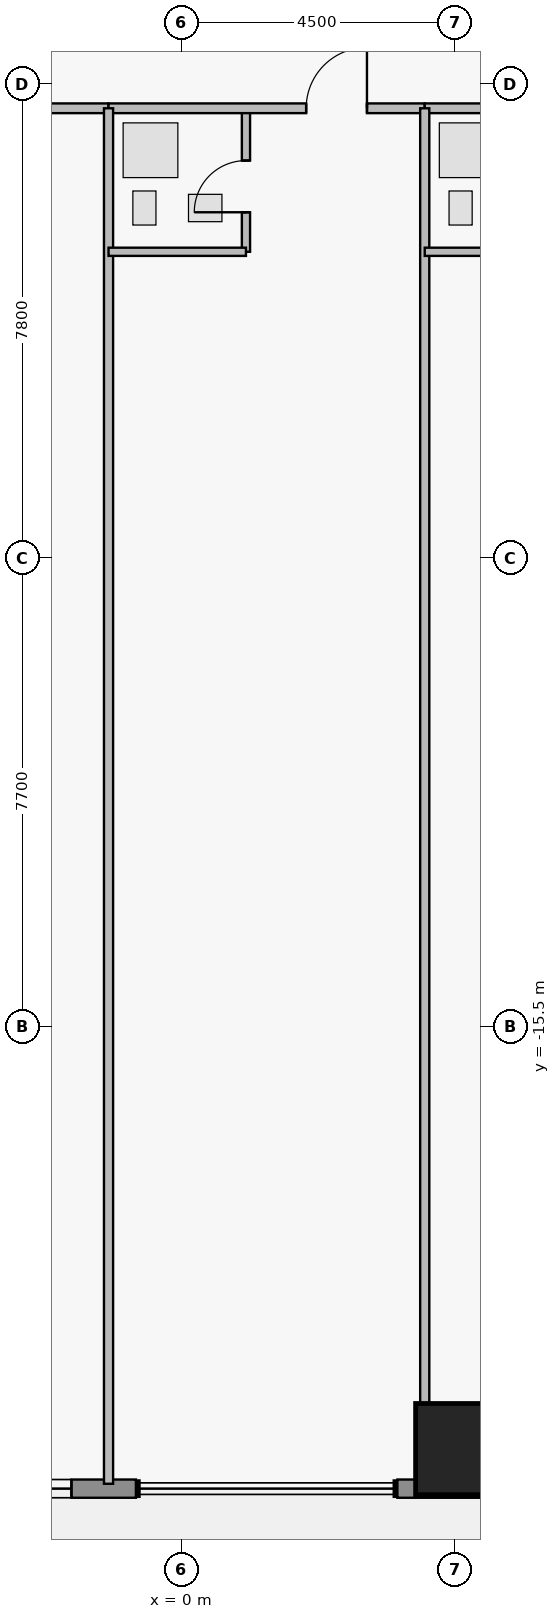
"""IFC4 building model, lengths in metres.
Left out: names, types, materials, properties, quantities, classifications, styles, units other than length and angle.
Written with IfcOpenShell. Run it as: python <this file> out.ifc"""

import sys

from ifc_helpers import new_model, si_unit, direction, frame, frame_2d, origin, origin_2d, place, context, subcontext, project, spatial, rectangle, extrude, element, fill, save


model = new_model("IFC4")
c1 = context("Model", 3, precision=1e-05, world=origin(), true_north=direction((0.0, 1.0)))
c2 = subcontext(c1, "Body", "Model", "MODEL_VIEW")
j1 = project(units=[si_unit("LENGTHUNIT", "METRE"), si_unit("PLANEANGLEUNIT", "RADIAN")], contexts=[c1])
p1 = place(None, origin())
s1 = spatial("IfcSite", under=j1, at=p1, CompositionType="ELEMENT")
p2 = place(p1, origin())
s2 = spatial("IfcBuilding", under=s1, at=p2, CompositionType="ELEMENT")
p3 = place(p2, frame((0.0, 0.0, 27.6)))
s3 = spatial("IfcBuildingStorey", under=s2, at=p3, CompositionType="ELEMENT", Elevation=27.6)
p4 = place(p3, frame((4.6, -22.45, 0.0), z_axis=(0.0, 0.0, 1.0), x_axis=(1.0, 0.0, 0.0)))
e1 = element("IfcColumn", 1, at=p4, inside=s3, PredefinedType="COLUMN", context=c2, shape_type="SweptSolid", body=[
    extrude(rectangle(XDim=1.5, YDim=1.5, at=origin_2d()), origin(), (0.0, 0.0, 1.0), 3.65),
])
p5 = place(p3, frame((5.52, -23.1, 0.0), z_axis=(0.0, 0.0, 1.0), x_axis=(-1.0, 0.0, 0.0)))
e2 = element("IfcWall", 2, at=p5, inside=s3, PredefinedType="STANDARD", context=c2, shape_type="SweptSolid", body=[
    extrude(rectangle(XDim=1.97, YDim=0.3, at=frame_2d((0.985, 0.0))), origin(), (0.0, 0.0, 1.0), 3.43),
])
p6 = place(p3, frame((-0.75, -23.1, 0.0), z_axis=(0.0, 0.0, 1.0), x_axis=(-1.0, 0.0, 0.0)))
e3 = element("IfcWall", 3, at=p6, inside=s3, PredefinedType="STANDARD", context=c2, shape_type="SweptSolid", body=[
    extrude(rectangle(XDim=13.97, YDim=0.3, at=frame_2d((6.985, 0.0))), origin(), (0.0, 0.0, 1.0), 3.43),
])
p7 = place(p6, frame((8.053, 0.0, 0.0)))
e4 = element("IfcOpeningElement", 4, at=p7, cuts=e3, PredefinedType="OPENING", context=c2, shape_type="SweptSolid", body=[
    extrude(rectangle(XDim=1.05, YDim=2.2, at=frame_2d((0.525, 1.1))), frame((0.0, 0.16, 0.0), z_axis=(0.0, -1.0, 0.0), x_axis=(1.0, 0.0, 0.0)), (0.0, 0.0, 1.0), 0.32),
])
p8 = place(p6, frame((1.06, 0.0, 0.85)))
e5 = element("IfcOpeningElement", 5, at=p8, cuts=e3, PredefinedType="OPENING", context=c2, shape_type="SweptSolid", body=[
    extrude(rectangle(XDim=1.6, YDim=1.8, at=frame_2d((0.8, 0.9))), frame((0.0, 0.16, 0.0), z_axis=(0.0, -1.0, 0.0), x_axis=(1.0, 0.0, 0.0)), (0.0, 0.0, 1.0), 0.32),
])
p9 = place(p6, frame((4.865, 0.0, 0.95)))
e6 = element("IfcOpeningElement", 6, at=p9, cuts=e3, PredefinedType="OPENING", context=c2, shape_type="SweptSolid", body=[
    extrude(rectangle(XDim=1.15, YDim=1.55, at=frame_2d((0.575, 0.775))), frame((0.0, 0.16, 0.0), z_axis=(0.0, -1.0, 0.0), x_axis=(1.0, 0.0, 0.0)), (0.0, 0.0, 1.0), 0.32),
])
p10 = place(p6, frame((9.842, 0.0, 0.85)))
e7 = element("IfcOpeningElement", 7, at=p10, cuts=e3, PredefinedType="OPENING", context=c2, shape_type="SweptSolid", body=[
    extrude(rectangle(XDim=1.6, YDim=1.8, at=frame_2d((0.8, 0.9))), frame((0.0, 0.16, 0.0), z_axis=(0.0, -1.0, 0.0), x_axis=(1.0, 0.0, 0.0)), (0.0, 0.0, 1.0), 0.32),
])
p11 = place(p3, frame((-7.2, -0.4, 0.0), z_axis=(0.0, 0.0, 1.0), x_axis=(1.0, 0.0, 0.0)))
e8 = element("IfcWall", 8, at=p11, inside=s3, PredefinedType="PARTITIONING", context=c2, shape_type="SweptSolid", body=[
    extrude(rectangle(XDim=6.0, YDim=0.16, at=frame_2d((3.0, 0.0))), origin(), (0.0, 0.0, 1.0), 3.43),
])
p12 = place(p11, frame((3.65, 0.0, 0.0)))
e9 = element("IfcOpeningElement", 9, at=p12, cuts=e8, PredefinedType="OPENING", context=c2, shape_type="SweptSolid", body=[
    extrude(rectangle(XDim=1.0, YDim=2.15, at=frame_2d((0.5, 1.075))), frame((0.0, 0.09, 0.0), z_axis=(0.0, -1.0, 0.0), x_axis=(1.0, 0.0, 0.0)), (0.0, 0.0, 1.0), 0.18),
])
p13 = place(p3, frame((1.06, -2.76, 0.0), z_axis=(0.0, 0.0, 1.0), x_axis=(0.0, 1.0, 0.0)))
e10 = element("IfcWall", 10, at=p13, inside=s3, PredefinedType="PLUMBINGWALL", context=c2, shape_type="SweptSolid", body=[
    extrude(rectangle(XDim=2.36, YDim=0.135, at=frame_2d((1.18, 0.0))), origin(), (0.0, 0.0, 1.0), 3.43),
])
p14 = place(p13, frame((0.65, 0.0, 0.0)))
e11 = element("IfcOpeningElement", 11, at=p14, cuts=e10, PredefinedType="OPENING", context=c2, shape_type="SweptSolid", body=[
    extrude(rectangle(XDim=0.85, YDim=2.1, at=frame_2d((0.425, 1.05))), frame((0.0, 0.077, 0.0), z_axis=(0.0, -1.0, 0.0), x_axis=(1.0, 0.0, 0.0)), (0.0, 0.0, 1.0), 0.155),
])
p15 = place(p3, frame((-1.2, -0.4, 0.0), z_axis=(0.0, 0.0, 1.0), x_axis=(1.0, 0.0, 0.0)))
e12 = element("IfcWall", 12, at=p15, inside=s3, PredefinedType="PARTITIONING", context=c2, shape_type="SweptSolid", body=[
    extrude(rectangle(XDim=5.2, YDim=0.16, at=frame_2d((2.6, 0.0))), origin(), (0.0, 0.0, 1.0), 3.43),
])
p16 = place(p15, frame((3.25, 0.0, 0.0)))
e13 = element("IfcOpeningElement", 13, at=p16, cuts=e12, PredefinedType="OPENING", context=c2, shape_type="SweptSolid", body=[
    extrude(rectangle(XDim=1.0, YDim=2.15, at=frame_2d((0.5, 1.075))), frame((0.0, 0.09, 0.0), z_axis=(0.0, -1.0, 0.0), x_axis=(1.0, 0.0, 0.0)), (0.0, 0.0, 1.0), 0.18),
])
p17 = place(p3, frame((4.0, -0.4, 0.0), z_axis=(0.0, 0.0, 1.0), x_axis=(1.0, 0.0, 0.0)))
e14 = element("IfcWall", 14, at=p17, inside=s3, PredefinedType="PARTITIONING", context=c2, shape_type="SweptSolid", body=[
    extrude(rectangle(XDim=5.8, YDim=0.16, at=frame_2d((2.9, 0.0))), origin(), (0.0, 0.0, 1.0), 3.43),
])
p18 = place(p17, frame((3.55, 0.0, 0.0)))
e15 = element("IfcOpeningElement", 15, at=p18, cuts=e14, PredefinedType="OPENING", context=c2, shape_type="SweptSolid", body=[
    extrude(rectangle(XDim=1.0, YDim=2.15, at=frame_2d((0.5, 1.075))), frame((0.0, 0.09, 0.0), z_axis=(0.0, -1.0, 0.0), x_axis=(1.0, 0.0, 0.0)), (0.0, 0.0, 1.0), 0.18),
])
p19 = place(p3, frame((-1.2, -23.02, 0.0), z_axis=(0.0, 0.0, 1.0), x_axis=(0.0, 1.0, 0.0)))
e16 = element("IfcWall", 16, at=p19, inside=s3, PredefinedType="PARTITIONING", context=c2, shape_type="SweptSolid", body=[
    extrude(rectangle(XDim=22.62, YDim=0.15, at=frame_2d((11.31, 0.0))), origin(), (0.0, 0.0, 1.0), 3.43),
])
p20 = place(p3, frame((-1.2, -2.76, 0.0), z_axis=(0.0, 0.0, 1.0), x_axis=(1.0, 0.0, 0.0)))
e17 = element("IfcWall", 17, at=p20, inside=s3, PredefinedType="PLUMBINGWALL", context=c2, shape_type="SweptSolid", body=[
    extrude(rectangle(XDim=2.26, YDim=0.135, at=frame_2d((1.13, 0.0))), origin(), (0.0, 0.0, 1.0), 3.43),
])
p21 = place(p3, frame((4.0, -23.02, 0.0), z_axis=(0.0, 0.0, 1.0), x_axis=(0.0, 1.0, 0.0)))
e18 = element("IfcWall", 18, at=p21, inside=s3, PredefinedType="PARTITIONING", context=c2, shape_type="SweptSolid", body=[
    extrude(rectangle(XDim=22.62, YDim=0.15, at=frame_2d((11.31, 0.0))), origin(), (0.0, 0.0, 1.0), 3.43),
])
p22 = place(p3, frame((4.0, -2.76, 0.0), z_axis=(0.0, 0.0, 1.0), x_axis=(1.0, 0.0, 0.0)))
e19 = element("IfcWall", 19, at=p22, inside=s3, PredefinedType="PLUMBINGWALL", context=c2, shape_type="SweptSolid", body=[
    extrude(rectangle(XDim=2.26, YDim=0.135, at=frame_2d((1.13, 0.0))), origin(), (0.0, 0.0, 1.0), 3.43),
])
p23 = place(p8, origin())
e20 = element("IfcWindow", 20, at=p23, inside=s3, PartitioningType="SINGLE_PANEL", PredefinedType="WINDOW", context=c2, shape_type="SweptSolid", body=[
    extrude(rectangle(XDim=1.6, YDim=1.8, at=frame_2d((0.8, 0.9))), frame((0.0, 0.03, 0.0), z_axis=(0.0, -1.0, 0.0), x_axis=(1.0, 0.0, 0.0)), (0.0, 0.0, 1.0), 0.06),
])
fill(e5, e20)
p24 = place(p14, origin())
e21 = element("IfcDoor", 21, at=p24, inside=s3, OperationType="SINGLE_SWING_LEFT", PredefinedType="DOOR", context=c2, shape_type="SweptSolid", body=[
    extrude(rectangle(XDim=0.85, YDim=2.1, at=frame_2d((0.425, 1.05))), frame((0.0, 0.025, 0.0), z_axis=(0.0, -1.0, 0.0), x_axis=(1.0, 0.0, 0.0)), (0.0, 0.0, 1.0), 0.05),
])
fill(e11, e21)
p25 = place(p16, origin())
e22 = element("IfcDoor", 22, at=p25, inside=s3, OperationType="SINGLE_SWING_RIGHT", PredefinedType="DOOR", context=c2, shape_type="SweptSolid", body=[
    extrude(rectangle(XDim=1.0, YDim=2.15, at=frame_2d((0.5, 1.075))), frame((0.0, 0.025, 0.0), z_axis=(0.0, -1.0, 0.0), x_axis=(1.0, 0.0, 0.0)), (0.0, 0.0, 1.0), 0.05),
])
fill(e13, e22)
save(model, sys.argv[1])
